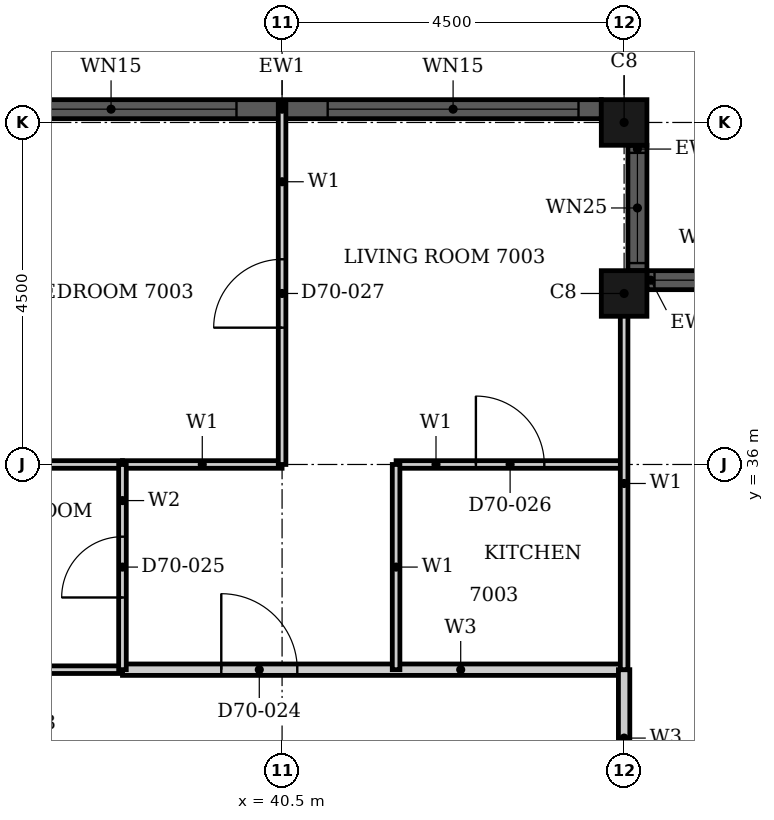
"""IFC4 building model, lengths in metres.
Left out: names, types, materials, properties, quantities, classifications, styles, units other than length and angle.
Written with IfcOpenShell. Run it as: python <this file> out.ifc"""

import sys

from ifc_helpers import new_model, si_unit, direction, frame, frame_2d, origin, origin_2d, place, context, subcontext, project, spatial, rectangle, hollow_rectangle, extrude, element, fill, save


model = new_model("IFC4")
c1 = context("Model", 3, precision=1e-05, world=origin(), true_north=direction((0.0, 1.0)))
c2 = subcontext(c1, "Body", "Model", "MODEL_VIEW")
j1 = project(units=[si_unit("LENGTHUNIT", "METRE"), si_unit("PLANEANGLEUNIT", "RADIAN")], contexts=[c1])
p1 = place(None, origin())
s1 = spatial("IfcSite", under=j1, at=p1, CompositionType="ELEMENT")
p2 = place(p1, origin())
s2 = spatial("IfcBuilding", under=s1, at=p2, CompositionType="ELEMENT")
p3 = place(p2, frame((0.0, 0.0, 274.9)))
s3 = spatial("IfcBuildingStorey", under=s2, at=p3, CompositionType="ELEMENT", Elevation=274.9)
for number, where, z_axis, x_axis in (
    (1, (45.0, 38.25, 0.0), (0.0, 0.0, 1.0), (1.0, 0.0, 0.0)),
    (2, (45.0, 40.5, 0.0), (0.0, 0.0, 1.0), (1.0, 0.0, 0.0)),
):
    element("IfcColumn", number, at=place(p3, frame(where, z_axis=z_axis, x_axis=x_axis)), inside=s3, PredefinedType="COLUMN", context=c2, shape_type="SweptSolid", body=[
        extrude(hollow_rectangle(XDim=0.6, YDim=0.6, WallThickness=0.02, at=origin_2d()), origin(), (0.0, 0.0, 1.0), 3.7),
    ])
p4 = place(p3, frame((46.95, 38.425, 0.0), z_axis=(0.0, 0.0, 1.0), x_axis=(-1.0, 0.0, 0.0)))
e3 = element("IfcWall", 3, at=p4, inside=s3, PredefinedType="SOLIDWALL", context=c2, shape_type="SweptSolid", body=[
    extrude(rectangle(XDim=1.65, YDim=0.25, at=frame_2d((0.825, 0.0))), origin(), (0.0, 0.0, 1.0), 3.7),
])
p5 = place(p4, frame((0.1, 0.0, 0.9)))
e4 = element("IfcOpeningElement", 4, at=p5, cuts=e3, PredefinedType="OPENING", context=c2, shape_type="SweptSolid", body=[
    extrude(rectangle(XDim=1.45, YDim=1.85, at=frame_2d((0.725, 0.925))), frame((0.0, 0.135, 0.0), z_axis=(0.0, -1.0, 0.0), x_axis=(1.0, 0.0, 0.0)), (0.0, 0.0, 1.0), 0.27),
])
p6 = place(p3, frame((45.175, 38.55, 0.0), z_axis=(0.0, 0.0, 1.0), x_axis=(0.0, 1.0, 0.0)))
e5 = element("IfcWall", 5, at=p6, inside=s3, PredefinedType="SOLIDWALL", context=c2, shape_type="SweptSolid", body=[
    extrude(rectangle(XDim=1.65, YDim=0.25, at=frame_2d((0.825, 0.0))), origin(), (0.0, 0.0, 1.0), 3.7),
])
p7 = place(p6, frame((0.1, 0.0, 0.9)))
e6 = element("IfcOpeningElement", 6, at=p7, cuts=e5, PredefinedType="OPENING", context=c2, shape_type="SweptSolid", body=[
    extrude(rectangle(XDim=1.45, YDim=1.85, at=frame_2d((0.725, 0.925))), frame((0.0, 0.135, 0.0), z_axis=(0.0, -1.0, 0.0), x_axis=(1.0, 0.0, 0.0)), (0.0, 0.0, 1.0), 0.27),
])
p8 = place(p3, frame((44.7, 40.675, 0.0), z_axis=(0.0, 0.0, 1.0), x_axis=(-1.0, 0.0, 0.0)))
e7 = element("IfcWall", 7, at=p8, inside=s3, PredefinedType="SOLIDWALL", context=c2, shape_type="SweptSolid", body=[
    extrude(rectangle(XDim=8.4, YDim=0.25, at=frame_2d((4.2, 0.0))), origin(), (0.0, 0.0, 1.0), 3.7),
])
p9 = place(p8, frame((0.3, 0.0, 0.45)))
e8 = element("IfcOpeningElement", 8, at=p9, cuts=e7, PredefinedType="OPENING", context=c2, shape_type="SweptSolid", body=[
    extrude(rectangle(XDim=3.3, YDim=2.3, at=frame_2d((1.65, 1.15))), frame((0.0, 0.135, 0.0), z_axis=(0.0, -1.0, 0.0), x_axis=(1.0, 0.0, 0.0)), (0.0, 0.0, 1.0), 0.27),
])
p10 = place(p8, frame((4.8, 0.0, 0.45)))
e9 = element("IfcOpeningElement", 9, at=p10, cuts=e7, PredefinedType="OPENING", context=c2, shape_type="SweptSolid", body=[
    extrude(rectangle(XDim=3.3, YDim=2.3, at=frame_2d((1.65, 1.15))), frame((0.0, 0.135, 0.0), z_axis=(0.0, -1.0, 0.0), x_axis=(1.0, 0.0, 0.0)), (0.0, 0.0, 1.0), 0.27),
])
p11 = place(p3, frame((38.4, 33.3, 0.0), z_axis=(0.0, 0.0, 1.0), x_axis=(1.0, 0.0, 0.0)))
e10 = element("IfcWall", 10, at=p11, inside=s3, PredefinedType="PARTITIONING", context=c2, shape_type="SweptSolid", body=[
    extrude(rectangle(XDim=6.6, YDim=0.15, at=frame_2d((3.3, 0.0))), origin(), (0.0, 0.0, 1.0), 3.3),
])
p12 = place(p11, frame((1.3, 0.0, 0.0)))
e11 = element("IfcOpeningElement", 11, at=p12, cuts=e10, PredefinedType="OPENING", context=c2, shape_type="SweptSolid", body=[
    extrude(rectangle(XDim=1.0, YDim=2.2, at=frame_2d((0.5, 1.1))), frame((0.0, 0.085, 0.0), z_axis=(0.0, -1.0, 0.0), x_axis=(1.0, 0.0, 0.0)), (0.0, 0.0, 1.0), 0.17),
])
p13 = place(p3, frame((45.0, 31.5, 0.0), z_axis=(0.0, 0.0, 1.0), x_axis=(0.0, 1.0, 0.0)))
e12 = element("IfcWall", 12, at=p13, inside=s3, PredefinedType="PARTITIONING", context=c2, shape_type="SweptSolid", body=[
    extrude(rectangle(XDim=1.8, YDim=0.15, at=frame_2d((0.9, 0.0))), origin(), (0.0, 0.0, 1.0), 3.3),
])
p14 = place(p3, frame((38.4, 36.0, 0.0), z_axis=(0.0, 0.0, 1.0), x_axis=(1.0, 0.0, 0.0)))
e13 = element("IfcWall", 13, at=p14, inside=s3, PredefinedType="PARTITIONING", context=c2, shape_type="SweptSolid", body=[
    extrude(rectangle(XDim=2.1, YDim=0.1, at=frame_2d((1.05, 0.0))), origin(), (0.0, 0.0, 1.0), 3.3),
])
p15 = place(p3, frame((42.0, 36.0, 0.0), z_axis=(0.0, 0.0, 1.0), x_axis=(1.0, 0.0, 0.0)))
e14 = element("IfcWall", 14, at=p15, inside=s3, PredefinedType="PARTITIONING", context=c2, shape_type="SweptSolid", body=[
    extrude(rectangle(XDim=3.0, YDim=0.1, at=frame_2d((1.5, 0.0))), origin(), (0.0, 0.0, 1.0), 3.3),
])
p16 = place(p15, frame((1.05, 0.0, 0.0)))
e15 = element("IfcOpeningElement", 15, at=p16, cuts=e14, PredefinedType="OPENING", context=c2, shape_type="SweptSolid", body=[
    extrude(rectangle(XDim=0.9, YDim=2.1, at=frame_2d((0.45, 1.05))), frame((0.0, 0.06, 0.0), z_axis=(0.0, -1.0, 0.0), x_axis=(1.0, 0.0, 0.0)), (0.0, 0.0, 1.0), 0.12),
])
p17 = place(p3, frame((40.5, 36.0, 0.0), z_axis=(0.0, 0.0, 1.0), x_axis=(0.0, 1.0, 0.0)))
e16 = element("IfcWall", 16, at=p17, inside=s3, PredefinedType="PARTITIONING", context=c2, shape_type="SweptSolid", body=[
    extrude(rectangle(XDim=4.74, YDim=0.1, at=frame_2d((2.37, 0.0))), origin(), (0.0, 0.0, 1.0), 3.3),
])
p18 = place(p17, frame((1.8, 0.0, 0.0)))
e17 = element("IfcOpeningElement", 17, at=p18, cuts=e16, PredefinedType="OPENING", context=c2, shape_type="SweptSolid", body=[
    extrude(rectangle(XDim=0.9, YDim=2.1, at=frame_2d((0.45, 1.05))), frame((0.0, 0.06, 0.0), z_axis=(0.0, -1.0, 0.0), x_axis=(1.0, 0.0, 0.0)), (0.0, 0.0, 1.0), 0.12),
])
p19 = place(p3, frame((42.0, 33.3, 0.0), z_axis=(0.0, 0.0, 1.0), x_axis=(0.0, 1.0, 0.0)))
e18 = element("IfcWall", 18, at=p19, inside=s3, PredefinedType="PARTITIONING", context=c2, shape_type="SweptSolid", body=[
    extrude(rectangle(XDim=2.7, YDim=0.1, at=frame_2d((1.35, 0.0))), origin(), (0.0, 0.0, 1.0), 3.3),
])
p20 = place(p3, frame((45.0, 33.3, 0.0), z_axis=(0.0, 0.0, 1.0), x_axis=(0.0, 1.0, 0.0)))
e19 = element("IfcWall", 19, at=p20, inside=s3, PredefinedType="PARTITIONING", context=c2, shape_type="SweptSolid", body=[
    extrude(rectangle(XDim=4.9, YDim=0.1, at=frame_2d((2.45, 0.0))), origin(), (0.0, 0.0, 1.0), 3.3),
])
for number, where, z_axis, x_axis in (
    (20, (36.0, 33.3, 0.0), (0.0, 0.0, 1.0), (1.0, 0.0, 0.0)),
    (21, (36.0, 36.0, 0.0), (0.0, 0.0, 1.0), (1.0, 0.0, 0.0)),
):
    element("IfcWall", number, at=place(p3, frame(where, z_axis=z_axis, x_axis=x_axis)), inside=s3, PredefinedType="PARTITIONING", context=c2, shape_type="SweptSolid", body=[
        extrude(rectangle(XDim=2.4, YDim=0.1, at=frame_2d((1.2, 0.0))), origin(), (0.0, 0.0, 1.0), 3.3),
    ])
p21 = place(p3, frame((38.4, 33.3, 0.0), z_axis=(0.0, 0.0, 1.0), x_axis=(0.0, 1.0, 0.0)))
e22 = element("IfcWall", 22, at=p21, inside=s3, PredefinedType="PARTITIONING", context=c2, shape_type="SweptSolid", body=[
    extrude(rectangle(XDim=2.7, YDim=0.1, at=frame_2d((1.35, 0.0))), origin(), (0.0, 0.0, 1.0), 3.3),
])
p22 = place(p21, frame((0.95, 0.0, 0.0)))
e23 = element("IfcOpeningElement", 23, at=p22, cuts=e22, PredefinedType="OPENING", context=c2, shape_type="SweptSolid", body=[
    extrude(rectangle(XDim=0.8, YDim=2.1, at=frame_2d((0.4, 1.05))), frame((0.0, 0.06, 0.0), z_axis=(0.0, -1.0, 0.0), x_axis=(1.0, 0.0, 0.0)), (0.0, 0.0, 1.0), 0.12),
])
p23 = place(p5, origin())
e24 = element("IfcWindow", 24, at=p23, inside=s3, PartitioningType="SINGLE_PANEL", PredefinedType="WINDOW", context=c2, shape_type="SweptSolid", body=[
    extrude(rectangle(XDim=1.45, YDim=1.85, at=frame_2d((0.725, 0.925))), frame((0.0, 0.03, 0.0), z_axis=(0.0, -1.0, 0.0), x_axis=(1.0, 0.0, 0.0)), (0.0, 0.0, 1.0), 0.06),
])
fill(e4, e24)
p24 = place(p7, origin())
e25 = element("IfcWindow", 25, at=p24, inside=s3, PartitioningType="SINGLE_PANEL", PredefinedType="WINDOW", context=c2, shape_type="SweptSolid", body=[
    extrude(rectangle(XDim=1.45, YDim=1.85, at=frame_2d((0.725, 0.925))), frame((0.0, 0.03, 0.0), z_axis=(0.0, -1.0, 0.0), x_axis=(1.0, 0.0, 0.0)), (0.0, 0.0, 1.0), 0.06),
])
fill(e6, e25)
p25 = place(p9, origin())
e26 = element("IfcWindow", 26, at=p25, inside=s3, PartitioningType="SINGLE_PANEL", PredefinedType="WINDOW", context=c2, shape_type="SweptSolid", body=[
    extrude(rectangle(XDim=3.3, YDim=2.3, at=frame_2d((1.65, 1.15))), frame((0.0, 0.03, 0.0), z_axis=(0.0, -1.0, 0.0), x_axis=(1.0, 0.0, 0.0)), (0.0, 0.0, 1.0), 0.06),
])
fill(e8, e26)
p26 = place(p10, origin())
e27 = element("IfcWindow", 27, at=p26, inside=s3, PartitioningType="SINGLE_PANEL", PredefinedType="WINDOW", context=c2, shape_type="SweptSolid", body=[
    extrude(rectangle(XDim=3.3, YDim=2.3, at=frame_2d((1.65, 1.15))), frame((0.0, 0.03, 0.0), z_axis=(0.0, -1.0, 0.0), x_axis=(1.0, 0.0, 0.0)), (0.0, 0.0, 1.0), 0.06),
])
fill(e9, e27)
p27 = place(p12, origin())
e28 = element("IfcDoor", 28, at=p27, inside=s3, OperationType="SINGLE_SWING_LEFT", PredefinedType="DOOR", context=c2, shape_type="SweptSolid", body=[
    extrude(rectangle(XDim=1.0, YDim=2.2, at=frame_2d((0.5, 1.1))), frame((0.0, 0.025, 0.0), z_axis=(0.0, -1.0, 0.0), x_axis=(1.0, 0.0, 0.0)), (0.0, 0.0, 1.0), 0.05),
])
fill(e11, e28)
p28 = place(p22, origin())
e29 = element("IfcDoor", 29, at=p28, inside=s3, OperationType="SINGLE_SWING_RIGHT", PredefinedType="DOOR", context=c2, shape_type="SweptSolid", body=[
    extrude(rectangle(XDim=0.8, YDim=2.1, at=frame_2d((0.4, 1.05))), frame((0.0, 0.025, 0.0), z_axis=(0.0, -1.0, 0.0), x_axis=(1.0, 0.0, 0.0)), (0.0, 0.0, 1.0), 0.05),
])
fill(e23, e29)
p29 = place(p16, origin())
e30 = element("IfcDoor", 30, at=p29, inside=s3, OperationType="SINGLE_SWING_RIGHT", PredefinedType="DOOR", context=c2, shape_type="SweptSolid", body=[
    extrude(rectangle(XDim=0.9, YDim=2.1, at=frame_2d((0.45, 1.05))), frame((0.0, 0.025, 0.0), z_axis=(0.0, -1.0, 0.0), x_axis=(1.0, 0.0, 0.0)), (0.0, 0.0, 1.0), 0.05),
])
fill(e15, e30)
p30 = place(p18, origin())
e31 = element("IfcDoor", 31, at=p30, inside=s3, OperationType="SINGLE_SWING_LEFT", PredefinedType="DOOR", context=c2, shape_type="SweptSolid", body=[
    extrude(rectangle(XDim=0.9, YDim=2.1, at=frame_2d((0.45, 1.05))), frame((0.0, 0.025, 0.0), z_axis=(0.0, -1.0, 0.0), x_axis=(1.0, 0.0, 0.0)), (0.0, 0.0, 1.0), 0.05),
])
fill(e17, e31)
save(model, sys.argv[1])
